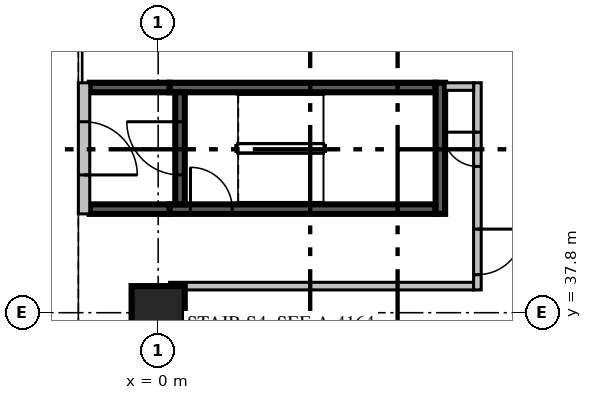
"""IFC4 building model, lengths in metres.
Left out: names, types, materials, properties, quantities, classifications, styles, units other than length and angle.
Written with IfcOpenShell. Run it as: python <this file> out.ifc"""

import sys

from ifc_helpers import new_model, si_unit, direction, frame, frame_2d, origin, origin_2d, place, context, subcontext, project, spatial, rectangle, extrude, source, transform, mapped, element, fill, save


model = new_model("IFC4")
c1 = context("Model", 3, precision=1e-05, world=origin(), true_north=direction((0.0, 1.0)))
c2 = subcontext(c1, "Body", "Model", "MODEL_VIEW")
j1 = project(units=[si_unit("LENGTHUNIT", "METRE"), si_unit("PLANEANGLEUNIT", "RADIAN")], contexts=[c1])
p1 = place(None, origin())
s1 = spatial("IfcSite", under=j1, at=p1, CompositionType="ELEMENT")
p2 = place(p1, origin())
s2 = spatial("IfcBuilding", under=s1, at=p2, CompositionType="ELEMENT")
p3 = place(p2, origin())
s3 = spatial("IfcBuildingStorey", under=s2, at=p3, CompositionType="ELEMENT", Elevation=0.0)
m1 = source(origin(), c2, "Body", "SweptSolid", [
    extrude(rectangle(XDim=1.4, YDim=1.4, at=origin_2d()), origin(), (0.0, 0.0, 1.0), 7.5),
])
p4 = place(p3, frame((0.0, 37.8, 0.0), z_axis=(0.0, 0.0, 1.0), x_axis=(1.0, 0.0, 0.0)))
e1 = element("IfcColumn", 1, at=p4, inside=s3, PredefinedType="COLUMN", context=c2, shape_type="MappedRepresentation", body=[
    mapped(m1, transform((0.0, 0.0, 0.0), scale=1.0)),
])
m2 = source(origin(), c2, "Body", "SweptSolid", [
    extrude(rectangle(XDim=7.0, YDim=0.25, at=frame_2d((3.5, 0.0))), origin(), (0.0, 0.0, 1.0), 6.9),
])
p5 = place(p3, frame((0.3, 40.525, 0.0), z_axis=(0.0, 0.0, 1.0), x_axis=(1.0, 0.0, 0.0)))
e2 = element("IfcWall", 2, at=p5, inside=s3, PredefinedType="SOLIDWALL", context=c2, shape_type="MappedRepresentation", body=[
    mapped(m2, transform((0.0, 0.0, 0.0), scale=1.0)),
])
m3 = source(origin(), c2, "Body", "SweptSolid", [
    extrude(rectangle(XDim=1.1, YDim=2.1, at=frame_2d((0.55, 1.05))), frame((0.0, 0.135, 0.0), z_axis=(0.0, -1.0, 0.0), x_axis=(1.0, 0.0, 0.0)), (0.0, 0.0, 1.0), 0.27),
])
p6 = place(p5, frame((0.55, 0.0, 0.0)))
e3 = element("IfcOpeningElement", 3, at=p6, cuts=e2, PredefinedType="OPENING", context=c2, shape_type="MappedRepresentation", body=[
    mapped(m3, transform((0.0, 0.0, 0.0), scale=1.0)),
])
p7 = place(p3, frame((0.3, 43.725, 0.0), z_axis=(0.0, 0.0, 1.0), x_axis=(1.0, 0.0, 0.0)))
e4 = element("IfcWall", 4, at=p7, inside=s3, PredefinedType="SOLIDWALL", context=c2, shape_type="MappedRepresentation", body=[
    mapped(m2, transform((0.0, 0.0, 0.0), scale=1.0)),
])
m4 = source(origin(), c2, "Body", "SweptSolid", [
    extrude(rectangle(XDim=3.45, YDim=0.25, at=frame_2d((1.725, 0.0))), origin(), (0.0, 0.0, 1.0), 6.9),
])
p8 = place(p3, frame((7.425, 40.4, 0.0), z_axis=(0.0, 0.0, 1.0), x_axis=(0.0, 1.0, 0.0)))
e5 = element("IfcWall", 5, at=p8, inside=s3, PredefinedType="SOLIDWALL", context=c2, shape_type="MappedRepresentation", body=[
    mapped(m4, transform((0.0, 0.0, 0.0), scale=1.0)),
])
m5 = source(origin(), c2, "Body", "SweptSolid", [
    extrude(rectangle(XDim=2.95, YDim=0.25, at=frame_2d((1.475, 0.0))), origin(), (0.0, 0.0, 1.0), 6.9),
])
p9 = place(p3, frame((0.575, 43.6, 0.0), z_axis=(0.0, 0.0, 1.0), x_axis=(0.0, -1.0, 0.0)))
e6 = element("IfcWall", 6, at=p9, inside=s3, PredefinedType="SOLIDWALL", context=c2, shape_type="MappedRepresentation", body=[
    mapped(m5, transform((0.0, 0.0, 0.0), scale=1.0)),
])
m6 = source(origin(), c2, "Body", "SweptSolid", [
    extrude(rectangle(XDim=1.4, YDim=2.1, at=frame_2d((0.7, 1.05))), frame((0.0, 0.135, 0.0), z_axis=(0.0, -1.0, 0.0), x_axis=(1.0, 0.0, 0.0)), (0.0, 0.0, 1.0), 0.27),
])
p10 = place(p9, frame((0.775, 0.0, 0.0)))
e7 = element("IfcOpeningElement", 7, at=p10, cuts=e6, PredefinedType="OPENING", context=c2, shape_type="MappedRepresentation", body=[
    mapped(m6, transform((0.0, 0.0, 0.0), scale=1.0)),
])
m7 = source(origin(), c2, "Body", "SweptSolid", [
    extrude(rectangle(XDim=8.0, YDim=0.2, at=frame_2d((4.0, 0.0))), origin(), (0.0, 0.0, 1.0), 6.9),
])
p11 = place(p3, frame((0.3, 38.5, 0.0), z_axis=(0.0, 0.0, 1.0), x_axis=(1.0, 0.0, 0.0)))
e8 = element("IfcWall", 8, at=p11, inside=s3, PredefinedType="PARTITIONING", context=c2, shape_type="MappedRepresentation", body=[
    mapped(m7, transform((0.0, 0.0, 0.0), scale=1.0)),
])
m8 = source(origin(), c2, "Body", "SweptSolid", [
    extrude(rectangle(XDim=5.45, YDim=0.2, at=frame_2d((2.725, 0.0))), origin(), (0.0, 0.0, 1.0), 6.9),
])
p12 = place(p3, frame((8.4, 43.85, 0.0), z_axis=(0.0, 0.0, 1.0), x_axis=(0.0, -1.0, 0.0)))
e9 = element("IfcWall", 9, at=p12, inside=s3, PredefinedType="PARTITIONING", context=c2, shape_type="MappedRepresentation", body=[
    mapped(m8, transform((0.0, 0.0, 0.0), scale=1.0)),
])
m9 = source(origin(), c2, "Body", "SweptSolid", [
    extrude(rectangle(XDim=1.2, YDim=2.1, at=frame_2d((0.6, 1.05))), frame((0.0, 0.11, 0.0), z_axis=(0.0, -1.0, 0.0), x_axis=(1.0, 0.0, 0.0)), (0.0, 0.0, 1.0), 0.22),
])
p13 = place(p12, frame((3.85, 0.0, 0.0)))
e10 = element("IfcOpeningElement", 10, at=p13, cuts=e9, PredefinedType="OPENING", context=c2, shape_type="MappedRepresentation", body=[
    mapped(m9, transform((0.0, 0.0, 0.0), scale=1.0)),
])
m10 = source(origin(), c2, "Body", "SweptSolid", [
    extrude(rectangle(XDim=0.9, YDim=2.1, at=frame_2d((0.45, 1.05))), frame((0.0, 0.11, 0.0), z_axis=(0.0, -1.0, 0.0), x_axis=(1.0, 0.0, 0.0)), (0.0, 0.0, 1.0), 0.22),
])
p14 = place(p12, frame((1.3, 0.0, 0.0)))
e11 = element("IfcOpeningElement", 11, at=p14, cuts=e9, PredefinedType="OPENING", context=c2, shape_type="MappedRepresentation", body=[
    mapped(m10, transform((0.0, 0.0, 0.0), scale=1.0)),
])
m11 = source(origin(), c2, "Body", "SweptSolid", [
    extrude(rectangle(XDim=0.75, YDim=0.2, at=frame_2d((0.375, 0.0))), origin(), (0.0, 0.0, 1.0), 6.9),
])
p15 = place(p3, frame((7.55, 43.75, 0.0), z_axis=(0.0, 0.0, 1.0), x_axis=(1.0, 0.0, 0.0)))
e12 = element("IfcWall", 12, at=p15, inside=s3, PredefinedType="PARTITIONING", context=c2, shape_type="MappedRepresentation", body=[
    mapped(m11, transform((0.0, 0.0, 0.0), scale=1.0)),
])
m12 = source(origin(), c2, "Body", "SweptSolid", [
    extrude(rectangle(XDim=2.1, YDim=0.25, at=frame_2d((1.05, 0.0))), origin(), (0.0, 0.0, 1.0), 6.9),
])
for number, where, z_axis, x_axis in (
    (13, (-1.8, 40.525, 0.0), (0.0, 0.0, 1.0), (1.0, 0.0, 0.0)),
    (14, (-1.8, 43.725, 0.0), (0.0, 0.0, 1.0), (1.0, 0.0, 0.0)),
):
    element("IfcWall", number, at=place(p3, frame(where, z_axis=z_axis, x_axis=x_axis)), inside=s3, PredefinedType="SOLIDWALL", context=c2, shape_type="MappedRepresentation", body=[
        mapped(m12, transform((0.0, 0.0, 0.0), scale=1.0)),
    ])
m13 = source(origin(), c2, "Body", "SweptSolid", [
    extrude(rectangle(XDim=3.45, YDim=0.3, at=frame_2d((1.725, 0.0))), origin(), (0.0, 0.0, 1.0), 6.9),
])
p16 = place(p3, frame((-1.95, 40.4, 0.0), z_axis=(0.0, 0.0, 1.0), x_axis=(0.0, 1.0, 0.0)))
e15 = element("IfcWall", 15, at=p16, inside=s3, PredefinedType="PARTITIONING", context=c2, shape_type="MappedRepresentation", body=[
    mapped(m13, transform((0.0, 0.0, 0.0), scale=1.0)),
])
m14 = source(origin(), c2, "Body", "SweptSolid", [
    extrude(rectangle(XDim=1.4, YDim=2.1, at=frame_2d((0.7, 1.05))), frame((0.0, 0.16, 0.0), z_axis=(0.0, -1.0, 0.0), x_axis=(1.0, 0.0, 0.0)), (0.0, 0.0, 1.0), 0.32),
])
p17 = place(p16, frame((1.025, 0.0, 0.0)))
e16 = element("IfcOpeningElement", 16, at=p17, cuts=e15, PredefinedType="OPENING", context=c2, shape_type="MappedRepresentation", body=[
    mapped(m14, transform((0.0, 0.0, 0.0), scale=1.0)),
])
m15 = source(origin(), c2, "Body", "SweptSolid", [
    extrude(rectangle(XDim=1.1, YDim=2.1, at=frame_2d((0.55, 1.05))), frame((0.0, 0.025, 0.0), z_axis=(0.0, -1.0, 0.0), x_axis=(1.0, 0.0, 0.0)), (0.0, 0.0, 1.0), 0.05),
])
p18 = place(p6, origin())
e17 = element("IfcDoor", 17, at=p18, inside=s3, OperationType="SINGLE_SWING_LEFT", PredefinedType="DOOR", context=c2, shape_type="MappedRepresentation", body=[
    mapped(m15, transform((0.0, 0.0, 0.0), scale=1.0)),
])
fill(e3, e17)
m16 = source(origin(), c2, "Body", "SweptSolid", [
    extrude(rectangle(XDim=1.4, YDim=2.1, at=frame_2d((0.7, 1.05))), frame((0.0, 0.025, 0.0), z_axis=(0.0, -1.0, 0.0), x_axis=(1.0, 0.0, 0.0)), (0.0, 0.0, 1.0), 0.05),
])
p19 = place(p10, origin())
e18 = element("IfcDoor", 18, at=p19, inside=s3, OperationType="DOUBLE_DOOR_SINGLE_SWING", PredefinedType="DOOR", context=c2, shape_type="MappedRepresentation", body=[
    mapped(m16, transform((0.0, 0.0, 0.0), scale=1.0)),
])
fill(e7, e18)
m17 = source(origin(), c2, "Body", "SweptSolid", [
    extrude(rectangle(XDim=1.2, YDim=2.1, at=frame_2d((0.6, 1.05))), frame((0.0, 0.025, 0.0), z_axis=(0.0, -1.0, 0.0), x_axis=(1.0, 0.0, 0.0)), (0.0, 0.0, 1.0), 0.05),
])
p20 = place(p13, origin())
e19 = element("IfcDoor", 19, at=p20, inside=s3, OperationType="SINGLE_SWING_LEFT", PredefinedType="DOOR", context=c2, shape_type="MappedRepresentation", body=[
    mapped(m17, transform((0.0, 0.0, 0.0), scale=1.0)),
])
fill(e10, e19)
m18 = source(origin(), c2, "Body", "SweptSolid", [
    extrude(rectangle(XDim=0.9, YDim=2.1, at=frame_2d((0.45, 1.05))), frame((0.0, 0.025, 0.0), z_axis=(0.0, -1.0, 0.0), x_axis=(1.0, 0.0, 0.0)), (0.0, 0.0, 1.0), 0.05),
])
p21 = place(p14, origin())
e20 = element("IfcDoor", 20, at=p21, inside=s3, OperationType="SINGLE_SWING_RIGHT", PredefinedType="DOOR", context=c2, shape_type="MappedRepresentation", body=[
    mapped(m18, transform((0.0, 0.0, 0.0), scale=1.0)),
])
fill(e11, e20)
p22 = place(p17, origin())
e21 = element("IfcDoor", 21, at=p22, inside=s3, OperationType="DOUBLE_DOOR_SINGLE_SWING", PredefinedType="DOOR", context=c2, shape_type="MappedRepresentation", body=[
    mapped(m16, transform((0.0, 0.0, 0.0), scale=1.0)),
])
fill(e16, e21)
save(model, sys.argv[1])
